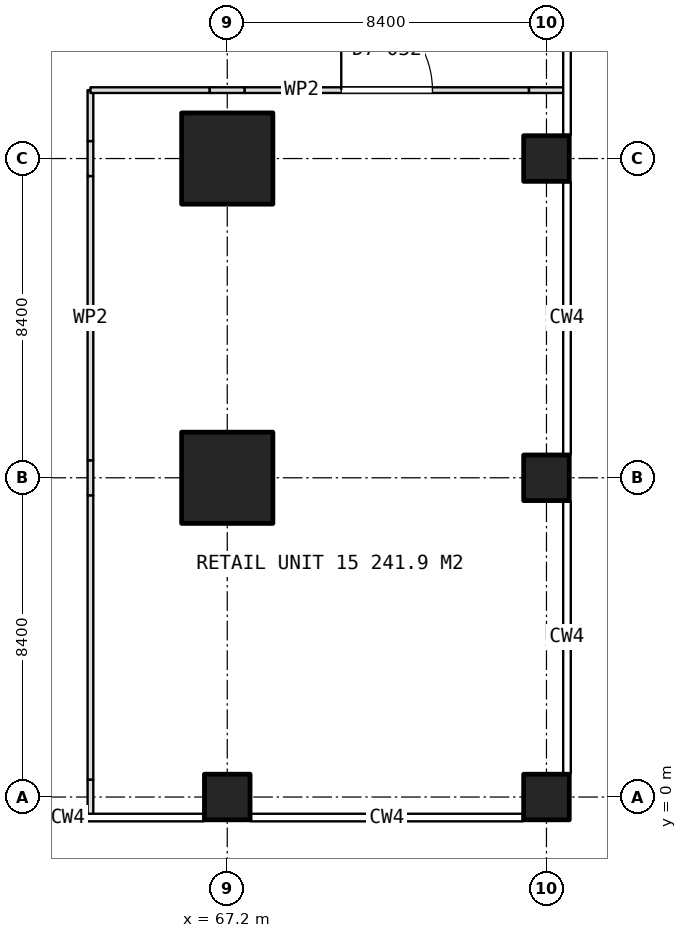
"""IFC4 building model, lengths in metres.
Left out: names, types, materials, properties, quantities, classifications, styles, units other than length and angle.
Written with IfcOpenShell. Run it as: python <this file> out.ifc"""

import sys

from ifc_helpers import new_model, si_unit, direction, frame, frame_2d, origin, origin_2d, place, context, subcontext, project, spatial, rectangle, extrude, element, fill, save


model = new_model("IFC4")
c1 = context("Model", 3, precision=1e-05, world=origin(), true_north=direction((0.0, 1.0)))
c2 = subcontext(c1, "Body", "Model", "MODEL_VIEW")
j1 = project(units=[si_unit("LENGTHUNIT", "METRE"), si_unit("PLANEANGLEUNIT", "RADIAN")], contexts=[c1])
p1 = place(None, origin())
s1 = spatial("IfcSite", under=j1, at=p1, CompositionType="ELEMENT")
p2 = place(p1, origin())
s2 = spatial("IfcBuilding", under=s1, at=p2, CompositionType="ELEMENT")
p3 = place(p2, frame((0.0, 0.0, 15.4)))
s3 = spatial("IfcBuildingStorey", under=s2, at=p3, CompositionType="ELEMENT", Elevation=15.4)
p4 = place(p3, frame((67.2, 0.0, 0.0), z_axis=(0.0, 0.0, 1.0), x_axis=(1.0, 0.0, 0.0)))
e1 = element("IfcColumn", 1, at=p4, inside=s3, PredefinedType="COLUMN", context=c2, shape_type="SweptSolid", body=[
    extrude(rectangle(XDim=1.2, YDim=1.2, at=origin_2d()), origin(), (0.0, 0.0, 1.0), 5.0),
])
for number, where, z_axis, x_axis in (
    (2, (67.2, 8.4, 0.0), (0.0, 0.0, 1.0), (1.0, 0.0, 0.0)),
    (3, (67.2, 16.8, 0.0), (0.0, 0.0, 1.0), (1.0, 0.0, 0.0)),
):
    element("IfcColumn", number, at=place(p3, frame(where, z_axis=z_axis, x_axis=x_axis)), inside=s3, PredefinedType="COLUMN", context=c2, shape_type="SweptSolid", body=[
        extrude(rectangle(XDim=2.4, YDim=2.4, at=origin_2d()), origin(), (0.0, 0.0, 1.0), 5.0),
    ])
for number, where, z_axis, x_axis in (
    (4, (75.6, 0.0, 0.0), (0.0, 0.0, 1.0), (1.0, 0.0, 0.0)),
    (5, (75.6, 8.4, 0.0), (0.0, 0.0, 1.0), (1.0, 0.0, 0.0)),
    (6, (75.6, 16.8, 0.0), (0.0, 0.0, 1.0), (1.0, 0.0, 0.0)),
):
    element("IfcColumn", number, at=place(p3, frame(where, z_axis=z_axis, x_axis=x_axis)), inside=s3, PredefinedType="COLUMN", context=c2, shape_type="SweptSolid", body=[
        extrude(rectangle(XDim=1.2, YDim=1.2, at=origin_2d()), origin(), (0.0, 0.0, 1.0), 5.0),
    ])
p5 = place(p3, frame((63.6, -0.49, 0.0), z_axis=(0.0, 0.0, 1.0), x_axis=(0.0, 1.0, 0.0)))
e7 = element("IfcWall", 7, at=p5, inside=s3, PredefinedType="PARTITIONING", context=c2, shape_type="SweptSolid", body=[
    extrude(rectangle(XDim=0.95, YDim=0.15, at=frame_2d((0.475, 0.0))), origin(), (0.0, 0.0, 1.0), 2.9),
])
p6 = place(p3, frame((63.6, 0.46, 0.0), z_axis=(0.0, 0.0, 1.0), x_axis=(0.0, 1.0, 0.0)))
e8 = element("IfcWall", 8, at=p6, inside=s3, PredefinedType="PARTITIONING", context=c2, shape_type="SweptSolid", body=[
    extrude(rectangle(XDim=7.48, YDim=0.15, at=frame_2d((3.74, 0.0))), origin(), (0.0, 0.0, 1.0), 4.7),
])
p7 = place(p3, frame((63.6, 7.94, 0.0), z_axis=(0.0, 0.0, 1.0), x_axis=(0.0, 1.0, 0.0)))
e9 = element("IfcWall", 9, at=p7, inside=s3, PredefinedType="PARTITIONING", context=c2, shape_type="SweptSolid", body=[
    extrude(rectangle(XDim=0.92, YDim=0.15, at=frame_2d((0.46, 0.0))), origin(), (0.0, 0.0, 1.0), 2.9),
])
p8 = place(p3, frame((63.6, 8.86, 0.0), z_axis=(0.0, 0.0, 1.0), x_axis=(0.0, 1.0, 0.0)))
e10 = element("IfcWall", 10, at=p8, inside=s3, PredefinedType="PARTITIONING", context=c2, shape_type="SweptSolid", body=[
    extrude(rectangle(XDim=7.48, YDim=0.15, at=frame_2d((3.74, 0.0))), origin(), (0.0, 0.0, 1.0), 4.7),
])
p9 = place(p3, frame((63.6, 16.34, 0.0), z_axis=(0.0, 0.0, 1.0), x_axis=(0.0, 1.0, 0.0)))
e11 = element("IfcWall", 11, at=p9, inside=s3, PredefinedType="PARTITIONING", context=c2, shape_type="SweptSolid", body=[
    extrude(rectangle(XDim=0.92, YDim=0.15, at=frame_2d((0.46, 0.0))), origin(), (0.0, 0.0, 1.0), 2.9),
])
p10 = place(p3, frame((63.6, 17.26, 0.0), z_axis=(0.0, 0.0, 1.0), x_axis=(0.0, 1.0, 0.0)))
e12 = element("IfcWall", 12, at=p10, inside=s3, PredefinedType="PARTITIONING", context=c2, shape_type="SweptSolid", body=[
    extrude(rectangle(XDim=1.34, YDim=0.15, at=frame_2d((0.67, 0.0))), origin(), (0.0, 0.0, 1.0), 4.7),
])
p11 = place(p3, frame((63.6, 18.6, 0.0), z_axis=(0.0, 0.0, 1.0), x_axis=(1.0, 0.0, 0.0)))
e13 = element("IfcWall", 13, at=p11, inside=s3, PredefinedType="PARTITIONING", context=c2, shape_type="SweptSolid", body=[
    extrude(rectangle(XDim=3.14, YDim=0.15, at=frame_2d((1.57, 0.0))), origin(), (0.0, 0.0, 1.0), 4.7),
])
p12 = place(p3, frame((66.74, 18.6, 0.0), z_axis=(0.0, 0.0, 1.0), x_axis=(1.0, 0.0, 0.0)))
e14 = element("IfcWall", 14, at=p12, inside=s3, PredefinedType="PARTITIONING", context=c2, shape_type="SweptSolid", body=[
    extrude(rectangle(XDim=0.92, YDim=0.15, at=frame_2d((0.46, 0.0))), origin(), (0.0, 0.0, 1.0), 2.9),
])
p13 = place(p3, frame((67.66, 18.6, 0.0), z_axis=(0.0, 0.0, 1.0), x_axis=(1.0, 0.0, 0.0)))
e15 = element("IfcWall", 15, at=p13, inside=s3, PredefinedType="PARTITIONING", context=c2, shape_type="SweptSolid", body=[
    extrude(rectangle(XDim=7.48, YDim=0.15, at=frame_2d((3.74, 0.0))), origin(), (0.0, 0.0, 1.0), 4.7),
])
p14 = place(p13, frame((2.54, 0.0, 0.0)))
e16 = element("IfcOpeningElement", 16, at=p14, cuts=e15, PredefinedType="OPENING", context=c2, shape_type="SweptSolid", body=[
    extrude(rectangle(XDim=2.4, YDim=2.4, at=frame_2d((1.2, 1.2))), frame((0.0, 0.085, 0.0), z_axis=(0.0, -1.0, 0.0), x_axis=(1.0, 0.0, 0.0)), (0.0, 0.0, 1.0), 0.17),
])
p15 = place(p3, frame((75.14, 18.6, 0.0), z_axis=(0.0, 0.0, 1.0), x_axis=(1.0, 0.0, 0.0)))
e17 = element("IfcWall", 17, at=p15, inside=s3, PredefinedType="PARTITIONING", context=c2, shape_type="SweptSolid", body=[
    extrude(rectangle(XDim=0.95, YDim=0.15, at=frame_2d((0.475, 0.0))), origin(), (0.0, 0.0, 1.0), 2.9),
])
p16 = place(p14, origin())
e18 = element("IfcDoor", 18, at=p16, inside=s3, OperationType="DOUBLE_DOOR_SINGLE_SWING", PredefinedType="DOOR", context=c2, shape_type="SweptSolid", body=[
    extrude(rectangle(XDim=2.4, YDim=2.4, at=frame_2d((1.2, 1.2))), frame((0.0, 0.025, 0.0), z_axis=(0.0, -1.0, 0.0), x_axis=(1.0, 0.0, 0.0)), (0.0, 0.0, 1.0), 0.05),
])
fill(e16, e18)
save(model, sys.argv[1])
